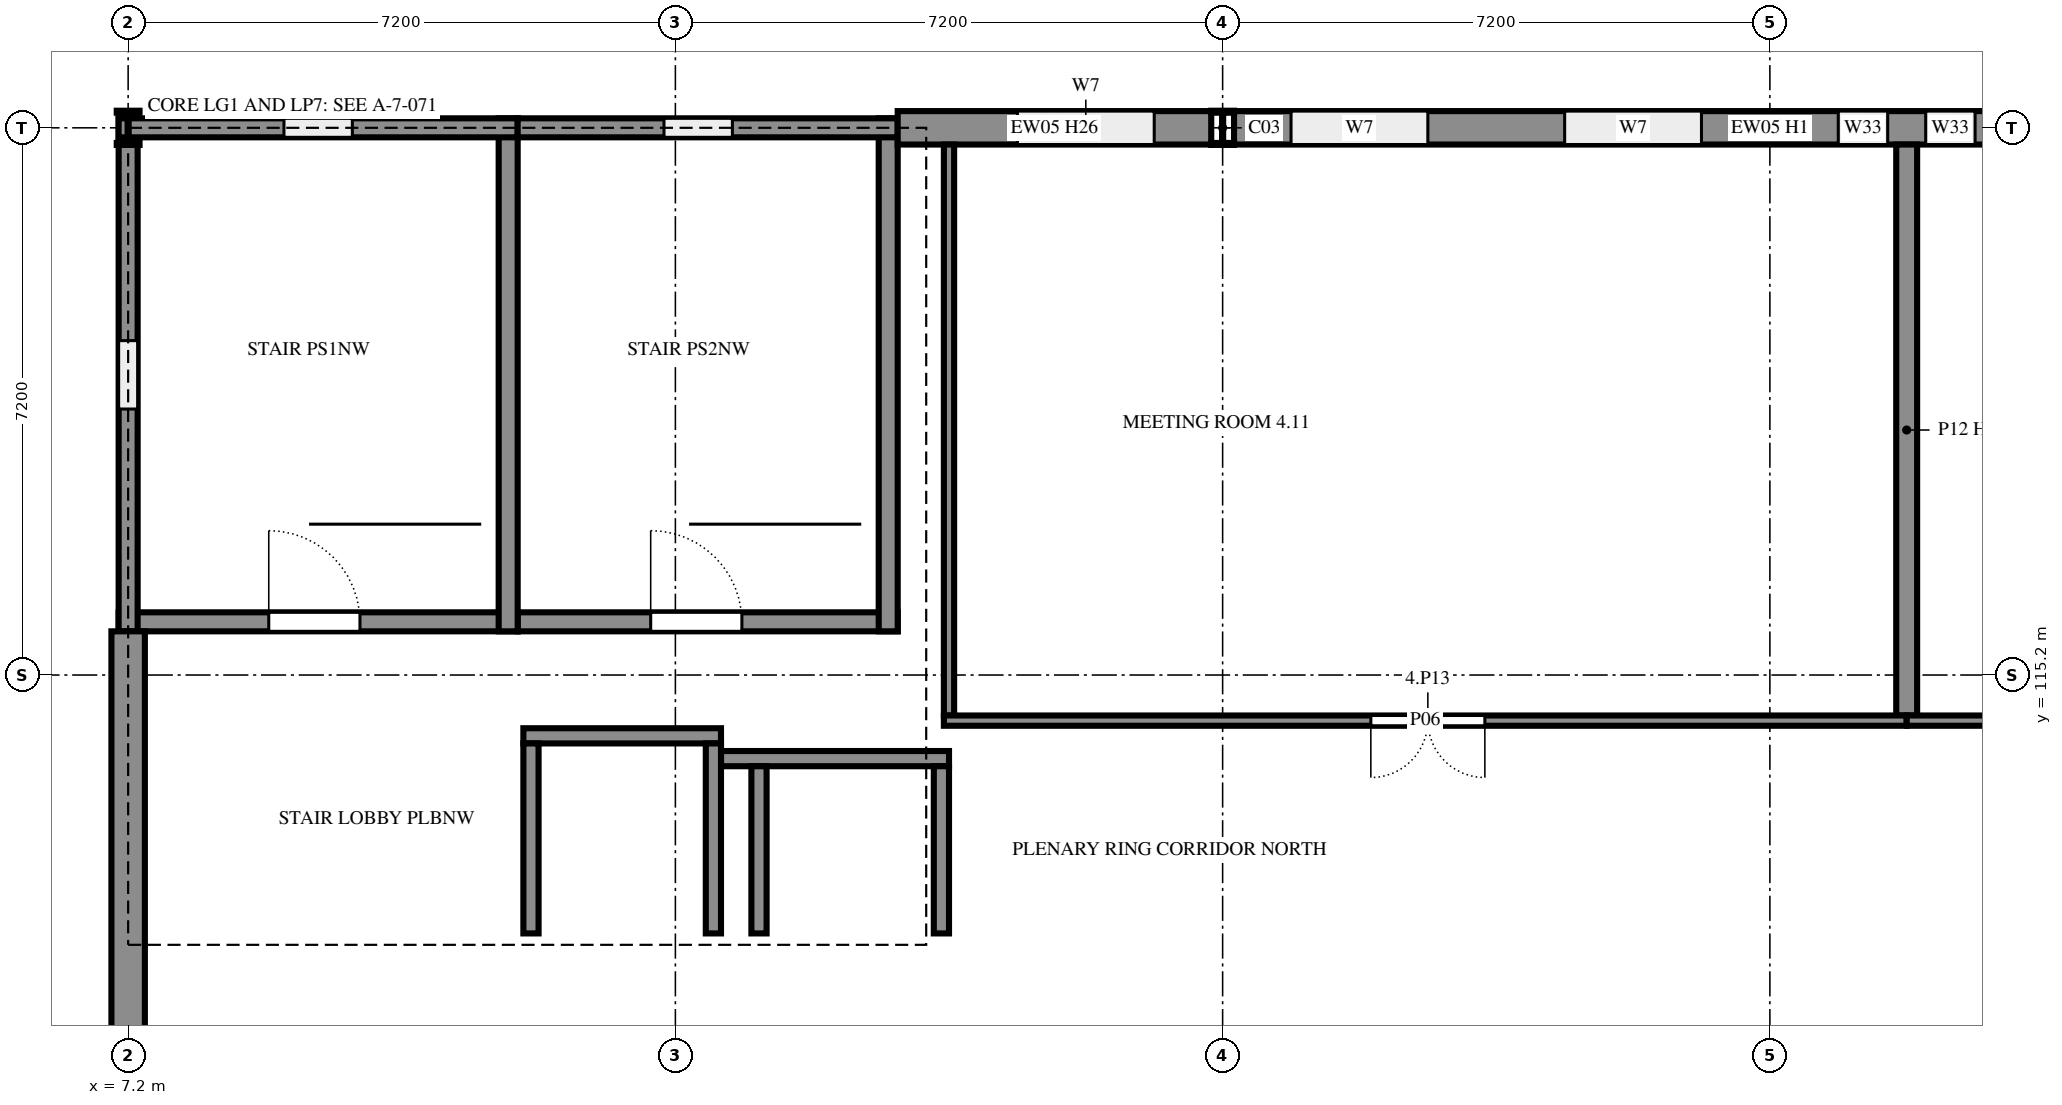
"""IFC4 building model, lengths in metres.
Left out: names, types, materials, properties, quantities, classifications, styles, units other than length and angle.
Written with IfcOpenShell. Run it as: python <this file> out.ifc"""

import sys

from ifc_helpers import new_model, si_unit, direction, frame, frame_2d, origin, origin_2d, place, context, subcontext, project, spatial, rectangle, i_section, extrude, element, fill, save


model = new_model("IFC4")
c1 = context("Model", 3, precision=1e-05, world=origin(), true_north=direction((0.0, 1.0)))
c2 = subcontext(c1, "Body", "Model", "MODEL_VIEW")
j1 = project(units=[si_unit("LENGTHUNIT", "METRE"), si_unit("PLANEANGLEUNIT", "RADIAN")], contexts=[c1])
p1 = place(None, origin())
s1 = spatial("IfcSite", under=j1, at=p1, CompositionType="ELEMENT")
p2 = place(p1, origin())
s2 = spatial("IfcBuilding", under=s1, at=p2, CompositionType="ELEMENT")
p3 = place(p2, frame((0.0, 0.0, 14.4)))
s3 = spatial("IfcBuildingStorey", under=s2, at=p3, CompositionType="ELEMENT", Elevation=14.4)
for number, where, z_axis, x_axis in (
    (1, (7.2, 122.4, 0.0), (0.0, 0.0, 1.0), (1.0, 0.0, 0.0)),
    (2, (21.6, 122.4, 0.0), (0.0, 0.0, 1.0), (1.0, 0.0, 0.0)),
):
    element("IfcColumn", number, at=place(p3, frame(where, z_axis=z_axis, x_axis=x_axis)), inside=s3, PredefinedType="COLUMN", context=c2, shape_type="SweptSolid", body=[
        extrude(i_section(OverallWidth=0.3, OverallDepth=0.45, WebThickness=0.014, FlangeThickness=0.026, FilletRadius=0.027, at=origin_2d()), origin(), (0.0, 0.0, 1.0), 3.6),
    ])
p4 = place(p3, frame((7.075, 115.9, 0.0), z_axis=(0.0, 0.0, 1.0), x_axis=(1.0, 0.0, 0.0)))
e3 = element("IfcWall", 3, at=p4, inside=s3, PredefinedType="SHEAR", context=c2, shape_type="SweptSolid", body=[
    extrude(rectangle(XDim=5.25, YDim=0.25, at=frame_2d((2.625, 0.0))), origin(), (0.0, 0.0, 1.0), 3.6),
])
p5 = place(p4, frame((1.975, 0.0, 0.0)))
e4 = element("IfcOpeningElement", 4, at=p5, cuts=e3, PredefinedType="OPENING", context=c2, shape_type="SweptSolid", body=[
    extrude(rectangle(XDim=1.2, YDim=2.4, at=frame_2d((0.6, 1.2))), frame((0.0, 0.135, 0.0), z_axis=(0.0, -1.0, 0.0), x_axis=(1.0, 0.0, 0.0)), (0.0, 0.0, 1.0), 0.27),
])
p6 = place(p3, frame((12.325, 115.9, 0.0), z_axis=(0.0, 0.0, 1.0), x_axis=(1.0, 0.0, 0.0)))
e5 = element("IfcWall", 5, at=p6, inside=s3, PredefinedType="SHEAR", context=c2, shape_type="SweptSolid", body=[
    extrude(rectangle(XDim=5.0, YDim=0.25, at=frame_2d((2.5, 0.0))), origin(), (0.0, 0.0, 1.0), 3.6),
])
p7 = place(p6, frame((1.75, 0.0, 0.0)))
e6 = element("IfcOpeningElement", 6, at=p7, cuts=e5, PredefinedType="OPENING", context=c2, shape_type="SweptSolid", body=[
    extrude(rectangle(XDim=1.2, YDim=2.4, at=frame_2d((0.6, 1.2))), frame((0.0, 0.135, 0.0), z_axis=(0.0, -1.0, 0.0), x_axis=(1.0, 0.0, 0.0)), (0.0, 0.0, 1.0), 0.27),
])
for number, where, z_axis, x_axis in (
    (7, (12.2, 115.775, 0.0), (0.0, 0.0, 1.0), (0.0, 1.0, 0.0)),
    (8, (17.2, 115.775, 0.0), (0.0, 0.0, 1.0), (0.0, 1.0, 0.0)),
):
    element("IfcWall", number, at=place(p3, frame(where, z_axis=z_axis, x_axis=x_axis)), inside=s3, PredefinedType="SHEAR", context=c2, shape_type="SweptSolid", body=[
        extrude(rectangle(XDim=6.75, YDim=0.25, at=frame_2d((3.375, 0.0))), origin(), (0.0, 0.0, 1.0), 3.6),
    ])
p8 = place(p3, frame((7.2, 122.525, 0.0), z_axis=(0.0, 0.0, 1.0), x_axis=(0.0, -1.0, 0.0)))
e9 = element("IfcWall", 9, at=p8, inside=s3, PredefinedType="SHEAR", context=c2, shape_type="SweptSolid", body=[
    extrude(rectangle(XDim=6.75, YDim=0.25, at=frame_2d((3.375, 0.0))), origin(), (0.0, 0.0, 1.0), 3.6),
])
p9 = place(p8, frame((2.925, 0.0, 0.6)))
e10 = element("IfcOpeningElement", 10, at=p9, cuts=e9, PredefinedType="OPENING", context=c2, shape_type="SweptSolid", body=[
    extrude(rectangle(XDim=0.9, YDim=2.1, at=frame_2d((0.45, 1.05))), frame((0.0, 0.135, 0.0), z_axis=(0.0, -1.0, 0.0), x_axis=(1.0, 0.0, 0.0)), (0.0, 0.0, 1.0), 0.27),
])
p10 = place(p3, frame((12.325, 122.4, 0.0), z_axis=(0.0, 0.0, 1.0), x_axis=(-1.0, 0.0, 0.0)))
e11 = element("IfcWall", 11, at=p10, inside=s3, PredefinedType="SHEAR", context=c2, shape_type="SweptSolid", body=[
    extrude(rectangle(XDim=5.25, YDim=0.25, at=frame_2d((2.625, 0.0))), origin(), (0.0, 0.0, 1.0), 3.6),
])
p11 = place(p10, frame((2.175, 0.0, 0.6)))
e12 = element("IfcOpeningElement", 12, at=p11, cuts=e11, PredefinedType="OPENING", context=c2, shape_type="SweptSolid", body=[
    extrude(rectangle(XDim=0.9, YDim=2.1, at=frame_2d((0.45, 1.05))), frame((0.0, 0.135, 0.0), z_axis=(0.0, -1.0, 0.0), x_axis=(1.0, 0.0, 0.0)), (0.0, 0.0, 1.0), 0.27),
])
p12 = place(p3, frame((17.325, 122.4, 0.0), z_axis=(0.0, 0.0, 1.0), x_axis=(-1.0, 0.0, 0.0)))
e13 = element("IfcWall", 13, at=p12, inside=s3, PredefinedType="SHEAR", context=c2, shape_type="SweptSolid", body=[
    extrude(rectangle(XDim=5.0, YDim=0.25, at=frame_2d((2.5, 0.0))), origin(), (0.0, 0.0, 1.0), 3.6),
])
p13 = place(p12, frame((2.175, 0.0, 0.6)))
e14 = element("IfcOpeningElement", 14, at=p13, cuts=e13, PredefinedType="OPENING", context=c2, shape_type="SweptSolid", body=[
    extrude(rectangle(XDim=0.9, YDim=2.1, at=frame_2d((0.45, 1.05))), frame((0.0, 0.135, 0.0), z_axis=(0.0, -1.0, 0.0), x_axis=(1.0, 0.0, 0.0)), (0.0, 0.0, 1.0), 0.27),
])
p14 = place(p3, frame((35.85, 122.4, 0.0), z_axis=(0.0, 0.0, 1.0), x_axis=(-1.0, 0.0, 0.0)))
e15 = element("IfcWall", 15, at=p14, inside=s3, PredefinedType="SOLIDWALL", context=c2, shape_type="SweptSolid", body=[
    extrude(rectangle(XDim=14.1, YDim=0.44, at=frame_2d((7.05, 0.0))), origin(), (0.0, 0.0, 1.0), 2.82),
])
p15 = place(p14, frame((11.55, 0.0, 0.75)))
e16 = element("IfcOpeningElement", 16, at=p15, cuts=e15, PredefinedType="OPENING", context=c2, shape_type="SweptSolid", body=[
    extrude(rectangle(XDim=1.8, YDim=1.8, at=frame_2d((0.9, 0.9))), frame((0.0, 0.23, 0.0), z_axis=(0.0, -1.0, 0.0), x_axis=(1.0, 0.0, 0.0)), (0.0, 0.0, 1.0), 0.46),
])
p16 = place(p14, frame((7.95, 0.0, 0.75)))
e17 = element("IfcOpeningElement", 17, at=p16, cuts=e15, PredefinedType="OPENING", context=c2, shape_type="SweptSolid", body=[
    extrude(rectangle(XDim=1.8, YDim=1.8, at=frame_2d((0.9, 0.9))), frame((0.0, 0.23, 0.0), z_axis=(0.0, -1.0, 0.0), x_axis=(1.0, 0.0, 0.0)), (0.0, 0.0, 1.0), 0.46),
])
p17 = place(p14, frame((4.35, 0.0, 0.75)))
e18 = element("IfcOpeningElement", 18, at=p17, cuts=e15, PredefinedType="OPENING", context=c2, shape_type="SweptSolid", body=[
    extrude(rectangle(XDim=0.65, YDim=1.8, at=frame_2d((0.325, 0.9))), frame((0.0, 0.23, 0.0), z_axis=(0.0, -1.0, 0.0), x_axis=(1.0, 0.0, 0.0)), (0.0, 0.0, 1.0), 0.46),
])
p18 = place(p14, frame((5.5, 0.0, 0.75)))
e19 = element("IfcOpeningElement", 19, at=p18, cuts=e15, PredefinedType="OPENING", context=c2, shape_type="SweptSolid", body=[
    extrude(rectangle(XDim=0.65, YDim=1.8, at=frame_2d((0.325, 0.9))), frame((0.0, 0.23, 0.0), z_axis=(0.0, -1.0, 0.0), x_axis=(1.0, 0.0, 0.0)), (0.0, 0.0, 1.0), 0.46),
])
p19 = place(p14, frame((0.75, 0.0, 0.75)))
e20 = element("IfcOpeningElement", 20, at=p19, cuts=e15, PredefinedType="OPENING", context=c2, shape_type="SweptSolid", body=[
    extrude(rectangle(XDim=1.8, YDim=1.8, at=frame_2d((0.9, 0.9))), frame((0.0, 0.23, 0.0), z_axis=(0.0, -1.0, 0.0), x_axis=(1.0, 0.0, 0.0)), (0.0, 0.0, 1.0), 0.46),
])
p20 = place(p3, frame((21.45, 122.4, 0.0), z_axis=(0.0, 0.0, 1.0), x_axis=(-1.0, 0.0, 0.0)))
e21 = element("IfcWall", 21, at=p20, inside=s3, PredefinedType="SOLIDWALL", context=c2, shape_type="SweptSolid", body=[
    extrude(rectangle(XDim=4.125, YDim=0.44, at=frame_2d((2.062, 0.0))), origin(), (0.0, 0.0, 1.0), 3.15),
])
p21 = place(p20, frame((0.75, 0.0, 0.75)))
e22 = element("IfcOpeningElement", 22, at=p21, cuts=e21, PredefinedType="OPENING", context=c2, shape_type="SweptSolid", body=[
    extrude(rectangle(XDim=1.8, YDim=1.8, at=frame_2d((0.9, 0.9))), frame((0.0, 0.23, 0.0), z_axis=(0.0, -1.0, 0.0), x_axis=(1.0, 0.0, 0.0)), (0.0, 0.0, 1.0), 0.46),
])
p22 = place(p3, frame((7.2, 115.775, 0.0), z_axis=(0.0, 0.0, 1.0), x_axis=(0.0, -1.0, 0.0)))
e23 = element("IfcWall", 23, at=p22, inside=s3, PredefinedType="SOLIDWALL", context=c2, shape_type="SweptSolid", body=[
    extrude(rectangle(XDim=7.55, YDim=0.44, at=frame_2d((3.775, 0.0))), origin(), (0.0, 0.0, 1.0), 3.09),
])
p23 = place(p22, frame((5.075, 0.0, 0.75)))
e24 = element("IfcOpeningElement", 24, at=p23, cuts=e23, PredefinedType="OPENING", context=c2, shape_type="SweptSolid", body=[
    extrude(rectangle(XDim=1.8, YDim=1.8, at=frame_2d((0.9, 0.9))), frame((0.0, 0.23, 0.0), z_axis=(0.0, -1.0, 0.0), x_axis=(1.0, 0.0, 0.0)), (0.0, 0.0, 1.0), 0.46),
])
p24 = place(p3, frame((15.4, 111.7, 0.0), z_axis=(0.0, 0.0, 1.0), x_axis=(1.0, 0.0, 0.0)))
e25 = element("IfcWall", 25, at=p24, inside=s3, PredefinedType="SHEAR", context=c2, shape_type="SweptSolid", body=[
    extrude(rectangle(XDim=2.6, YDim=0.2, at=frame_2d((1.3, 0.0))), origin(), (0.0, 0.0, 1.0), 4.5),
])
p25 = place(p24, frame((0.75, 0.0, 0.0)))
e26 = element("IfcOpeningElement", 26, at=p25, cuts=e25, PredefinedType="OPENING", context=c2, shape_type="SweptSolid", body=[
    extrude(rectangle(XDim=1.1, YDim=2.1, at=frame_2d((0.55, 1.05))), frame((0.0, 0.11, 0.0), z_axis=(0.0, -1.0, 0.0), x_axis=(1.0, 0.0, 0.0)), (0.0, 0.0, 1.0), 0.22),
])
p26 = place(p3, frame((15.0, 114.1, 0.0), z_axis=(0.0, 0.0, 1.0), x_axis=(1.0, 0.0, 0.0)))
e27 = element("IfcWall", 27, at=p26, inside=s3, PredefinedType="SHEAR", context=c2, shape_type="SweptSolid", body=[
    extrude(rectangle(XDim=3.0, YDim=0.2, at=frame_2d((1.5, 0.0))), origin(), (0.0, 0.0, 1.0), 4.5),
])
for number, where, z_axis, x_axis in (
    (28, (15.5, 111.8, 0.0), (0.0, 0.0, 1.0), (0.0, 1.0, 0.0)),
    (29, (17.9, 111.8, 0.0), (0.0, 0.0, 1.0), (0.0, 1.0, 0.0)),
):
    element("IfcWall", number, at=place(p3, frame(where, z_axis=z_axis, x_axis=x_axis)), inside=s3, PredefinedType="SHEAR", context=c2, shape_type="SweptSolid", body=[
        extrude(rectangle(XDim=2.2, YDim=0.2, at=frame_2d((1.1, 0.0))), origin(), (0.0, 0.0, 1.0), 4.5),
    ])
p27 = place(p3, frame((12.4, 111.7, 0.0), z_axis=(0.0, 0.0, 1.0), x_axis=(1.0, 0.0, 0.0)))
e30 = element("IfcWall", 30, at=p27, inside=s3, PredefinedType="SHEAR", context=c2, shape_type="SweptSolid", body=[
    extrude(rectangle(XDim=3.0, YDim=0.2, at=frame_2d((1.5, 0.0))), origin(), (0.0, 0.0, 1.0), 4.5),
])
p28 = place(p27, frame((0.6, 0.0, 0.0)))
e31 = element("IfcOpeningElement", 31, at=p28, cuts=e30, PredefinedType="OPENING", context=c2, shape_type="SweptSolid", body=[
    extrude(rectangle(XDim=1.4, YDim=2.1, at=frame_2d((0.7, 1.05))), frame((0.0, 0.11, 0.0), z_axis=(0.0, -1.0, 0.0), x_axis=(1.0, 0.0, 0.0)), (0.0, 0.0, 1.0), 0.22),
])
p29 = place(p3, frame((12.4, 114.4, 0.0), z_axis=(0.0, 0.0, 1.0), x_axis=(1.0, 0.0, 0.0)))
e32 = element("IfcWall", 32, at=p29, inside=s3, PredefinedType="SHEAR", context=c2, shape_type="SweptSolid", body=[
    extrude(rectangle(XDim=2.6, YDim=0.2, at=frame_2d((1.3, 0.0))), origin(), (0.0, 0.0, 1.0), 4.5),
])
for number, where, z_axis, x_axis in (
    (33, (12.5, 111.8, 0.0), (0.0, 0.0, 1.0), (0.0, 1.0, 0.0)),
    (34, (14.9, 111.8, 0.0), (0.0, 0.0, 1.0), (0.0, 1.0, 0.0)),
):
    element("IfcWall", number, at=place(p3, frame(where, z_axis=z_axis, x_axis=x_axis)), inside=s3, PredefinedType="SHEAR", context=c2, shape_type="SweptSolid", body=[
        extrude(rectangle(XDim=2.5, YDim=0.2, at=frame_2d((1.25, 0.0))), origin(), (0.0, 0.0, 1.0), 4.5),
    ])
p30 = place(p3, frame((18.0, 122.18, 0.0), z_axis=(0.0, 0.0, 1.0), x_axis=(0.0, -1.0, 0.0)))
e35 = element("IfcWall", 35, at=p30, inside=s3, PredefinedType="PARTITIONING", context=c2, shape_type="SweptSolid", body=[
    extrude(rectangle(XDim=7.512, YDim=0.135, at=frame_2d((3.756, 0.0))), origin(), (0.0, 0.0, 1.0), 3.12),
])
p31 = place(p3, frame((30.6, 122.18, 0.0), z_axis=(0.0, 0.0, 1.0), x_axis=(0.0, -1.0, 0.0)))
e36 = element("IfcWall", 36, at=p31, inside=s3, PredefinedType="PARTITIONING", context=c2, shape_type="SweptSolid", body=[
    extrude(rectangle(XDim=7.512, YDim=0.275, at=frame_2d((3.756, 0.0))), origin(), (0.0, 0.0, 1.0), 3.42),
])
p32 = place(p3, frame((30.6, 114.6, 0.0), z_axis=(0.0, 0.0, 1.0), x_axis=(-1.0, 0.0, 0.0)))
e37 = element("IfcWall", 37, at=p32, inside=s3, PredefinedType="PARTITIONING", context=c2, shape_type="SweptSolid", body=[
    extrude(rectangle(XDim=12.667, YDim=0.135, at=frame_2d((6.334, 0.0))), origin(), (0.0, 0.0, 1.0), 3.42),
])
p33 = place(p32, frame((5.55, 0.0, 0.0)))
e38 = element("IfcOpeningElement", 38, at=p33, cuts=e37, PredefinedType="OPENING", context=c2, shape_type="SweptSolid", body=[
    extrude(rectangle(XDim=1.5, YDim=2.1, at=frame_2d((0.75, 1.05))), frame((0.0, 0.077, 0.0), z_axis=(0.0, -1.0, 0.0), x_axis=(1.0, 0.0, 0.0)), (0.0, 0.0, 1.0), 0.155),
])
p34 = place(p3, frame((43.2, 114.6, 0.0), z_axis=(0.0, 0.0, 1.0), x_axis=(-1.0, 0.0, 0.0)))
e39 = element("IfcWall", 39, at=p34, inside=s3, PredefinedType="PARTITIONING", context=c2, shape_type="SweptSolid", body=[
    extrude(rectangle(XDim=12.6, YDim=0.135, at=frame_2d((6.3, 0.0))), origin(), (0.0, 0.0, 1.0), 3.42),
])
p35 = place(p34, frame((5.55, 0.0, 0.0)))
e40 = element("IfcOpeningElement", 40, at=p35, cuts=e39, PredefinedType="OPENING", context=c2, shape_type="SweptSolid", body=[
    extrude(rectangle(XDim=1.5, YDim=2.1, at=frame_2d((0.75, 1.05))), frame((0.0, 0.077, 0.0), z_axis=(0.0, -1.0, 0.0), x_axis=(1.0, 0.0, 0.0)), (0.0, 0.0, 1.0), 0.155),
])
p36 = place(p15, origin())
e41 = element("IfcWindow", 41, at=p36, inside=s3, PartitioningType="SINGLE_PANEL", PredefinedType="WINDOW", context=c2, shape_type="SweptSolid", body=[
    extrude(rectangle(XDim=1.8, YDim=1.8, at=frame_2d((0.9, 0.9))), frame((0.0, 0.03, 0.0), z_axis=(0.0, -1.0, 0.0), x_axis=(1.0, 0.0, 0.0)), (0.0, 0.0, 1.0), 0.06),
])
fill(e16, e41)
p37 = place(p16, origin())
e42 = element("IfcWindow", 42, at=p37, inside=s3, PartitioningType="SINGLE_PANEL", PredefinedType="WINDOW", context=c2, shape_type="SweptSolid", body=[
    extrude(rectangle(XDim=1.8, YDim=1.8, at=frame_2d((0.9, 0.9))), frame((0.0, 0.03, 0.0), z_axis=(0.0, -1.0, 0.0), x_axis=(1.0, 0.0, 0.0)), (0.0, 0.0, 1.0), 0.06),
])
fill(e17, e42)
p38 = place(p17, origin())
e43 = element("IfcWindow", 43, at=p38, inside=s3, PartitioningType="SINGLE_PANEL", PredefinedType="WINDOW", context=c2, shape_type="SweptSolid", body=[
    extrude(rectangle(XDim=0.65, YDim=1.8, at=frame_2d((0.325, 0.9))), frame((0.0, 0.03, 0.0), z_axis=(0.0, -1.0, 0.0), x_axis=(1.0, 0.0, 0.0)), (0.0, 0.0, 1.0), 0.06),
])
fill(e18, e43)
p39 = place(p18, origin())
e44 = element("IfcWindow", 44, at=p39, inside=s3, PartitioningType="SINGLE_PANEL", PredefinedType="WINDOW", context=c2, shape_type="SweptSolid", body=[
    extrude(rectangle(XDim=0.65, YDim=1.8, at=frame_2d((0.325, 0.9))), frame((0.0, 0.03, 0.0), z_axis=(0.0, -1.0, 0.0), x_axis=(1.0, 0.0, 0.0)), (0.0, 0.0, 1.0), 0.06),
])
fill(e19, e44)
p40 = place(p21, origin())
e45 = element("IfcWindow", 45, at=p40, inside=s3, PartitioningType="SINGLE_PANEL", PredefinedType="WINDOW", context=c2, shape_type="SweptSolid", body=[
    extrude(rectangle(XDim=1.8, YDim=1.8, at=frame_2d((0.9, 0.9))), frame((0.0, 0.03, 0.0), z_axis=(0.0, -1.0, 0.0), x_axis=(1.0, 0.0, 0.0)), (0.0, 0.0, 1.0), 0.06),
])
fill(e22, e45)
p41 = place(p13, origin())
e46 = element("IfcWindow", 46, at=p41, inside=s3, PartitioningType="SINGLE_PANEL", PredefinedType="WINDOW", context=c2, shape_type="SweptSolid", body=[
    extrude(rectangle(XDim=0.9, YDim=2.1, at=frame_2d((0.45, 1.05))), frame((0.0, 0.03, 0.0), z_axis=(0.0, -1.0, 0.0), x_axis=(1.0, 0.0, 0.0)), (0.0, 0.0, 1.0), 0.06),
])
fill(e14, e46)
p42 = place(p11, origin())
e47 = element("IfcWindow", 47, at=p42, inside=s3, PartitioningType="SINGLE_PANEL", PredefinedType="WINDOW", context=c2, shape_type="SweptSolid", body=[
    extrude(rectangle(XDim=0.9, YDim=2.1, at=frame_2d((0.45, 1.05))), frame((0.0, 0.03, 0.0), z_axis=(0.0, -1.0, 0.0), x_axis=(1.0, 0.0, 0.0)), (0.0, 0.0, 1.0), 0.06),
])
fill(e12, e47)
p43 = place(p9, origin())
e48 = element("IfcWindow", 48, at=p43, inside=s3, PartitioningType="SINGLE_PANEL", PredefinedType="WINDOW", context=c2, shape_type="SweptSolid", body=[
    extrude(rectangle(XDim=0.9, YDim=2.1, at=frame_2d((0.45, 1.05))), frame((0.0, 0.03, 0.0), z_axis=(0.0, -1.0, 0.0), x_axis=(1.0, 0.0, 0.0)), (0.0, 0.0, 1.0), 0.06),
])
fill(e10, e48)
p44 = place(p23, origin())
e49 = element("IfcWindow", 49, at=p44, inside=s3, PartitioningType="SINGLE_PANEL", PredefinedType="WINDOW", context=c2, shape_type="SweptSolid", body=[
    extrude(rectangle(XDim=1.8, YDim=1.8, at=frame_2d((0.9, 0.9))), frame((0.0, 0.03, 0.0), z_axis=(0.0, -1.0, 0.0), x_axis=(1.0, 0.0, 0.0)), (0.0, 0.0, 1.0), 0.06),
])
fill(e24, e49)
p45 = place(p25, origin())
e50 = element("IfcDoor", 50, at=p45, inside=s3, OperationType="SLIDING_TO_LEFT", PredefinedType="DOOR", context=c2, shape_type="SweptSolid", body=[
    extrude(rectangle(XDim=1.1, YDim=2.1, at=frame_2d((0.55, 1.05))), frame((0.0, 0.025, 0.0), z_axis=(0.0, -1.0, 0.0), x_axis=(1.0, 0.0, 0.0)), (0.0, 0.0, 1.0), 0.05),
])
fill(e26, e50)
p46 = place(p28, origin())
e51 = element("IfcDoor", 51, at=p46, inside=s3, OperationType="SLIDING_TO_LEFT", PredefinedType="DOOR", context=c2, shape_type="SweptSolid", body=[
    extrude(rectangle(XDim=1.4, YDim=2.1, at=frame_2d((0.7, 1.05))), frame((0.0, 0.025, 0.0), z_axis=(0.0, -1.0, 0.0), x_axis=(1.0, 0.0, 0.0)), (0.0, 0.0, 1.0), 0.05),
])
fill(e31, e51)
p47 = place(p5, origin())
e52 = element("IfcDoor", 52, at=p47, inside=s3, OperationType="SINGLE_SWING_RIGHT", PredefinedType="DOOR", context=c2, shape_type="SweptSolid", body=[
    extrude(rectangle(XDim=1.2, YDim=2.4, at=frame_2d((0.6, 1.2))), frame((0.0, 0.025, 0.0), z_axis=(0.0, -1.0, 0.0), x_axis=(1.0, 0.0, 0.0)), (0.0, 0.0, 1.0), 0.05),
])
fill(e4, e52)
p48 = place(p7, origin())
e53 = element("IfcDoor", 53, at=p48, inside=s3, OperationType="SINGLE_SWING_RIGHT", PredefinedType="DOOR", context=c2, shape_type="SweptSolid", body=[
    extrude(rectangle(XDim=1.2, YDim=2.4, at=frame_2d((0.6, 1.2))), frame((0.0, 0.025, 0.0), z_axis=(0.0, -1.0, 0.0), x_axis=(1.0, 0.0, 0.0)), (0.0, 0.0, 1.0), 0.05),
])
fill(e6, e53)
p49 = place(p33, origin())
e54 = element("IfcDoor", 54, at=p49, inside=s3, OperationType="DOUBLE_DOOR_SINGLE_SWING", PredefinedType="DOOR", context=c2, shape_type="SweptSolid", body=[
    extrude(rectangle(XDim=1.5, YDim=2.1, at=frame_2d((0.75, 1.05))), frame((0.0, 0.025, 0.0), z_axis=(0.0, -1.0, 0.0), x_axis=(1.0, 0.0, 0.0)), (0.0, 0.0, 1.0), 0.05),
])
fill(e38, e54)
save(model, sys.argv[1])
